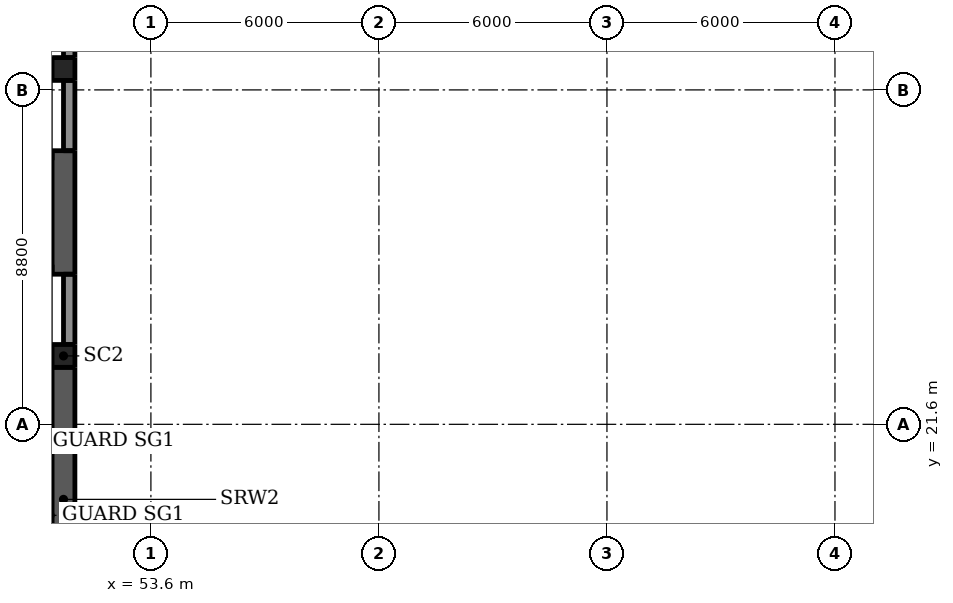
"""IFC4 building model, lengths in metres.
Left out: names, types, materials, properties, quantities, classifications, styles, units other than length and angle.
Written with IfcOpenShell. Run it as: python <this file> out.ifc"""

import sys

from ifc_helpers import new_model, si_unit, direction, frame, frame_2d, origin, origin_2d, place, context, subcontext, project, spatial, rectangle, extrude, element, fill, save


model = new_model("IFC4")
c1 = context("Model", 3, precision=1e-05, world=origin(), true_north=direction((0.0, 1.0)))
c2 = subcontext(c1, "Body", "Model", "MODEL_VIEW")
j1 = project(units=[si_unit("LENGTHUNIT", "METRE"), si_unit("PLANEANGLEUNIT", "RADIAN")], contexts=[c1])
p1 = place(None, origin())
s1 = spatial("IfcSite", under=j1, at=p1, CompositionType="ELEMENT")
p2 = place(p1, origin())
s2 = spatial("IfcBuilding", under=s1, at=p2, CompositionType="ELEMENT")
p3 = place(p2, frame((0.0, 0.0, 10.0)))
s3 = spatial("IfcBuildingStorey", under=s2, at=p3, CompositionType="ELEMENT", Elevation=10.0)
for number, where, z_axis, x_axis in (
    (1, (59.6, 20.6, 0.0), (0.0, 0.0, 1.0), (1.0, 0.0, 0.0)),
    (2, (65.6, 20.6, 0.0), (0.0, 0.0, 1.0), (1.0, 0.0, 0.0)),
    (3, (71.6, 20.6, 0.0), (0.0, 0.0, 1.0), (1.0, 0.0, 0.0)),
    (4, (52.6, 30.4, 0.0), (0.0, 0.0, 1.0), (1.0, 0.0, 0.0)),
):
    element("IfcColumn", number, at=place(p3, frame(where, z_axis=z_axis, x_axis=x_axis)), inside=s3, PredefinedType="COLUMN", context=c2, shape_type="SweptSolid", body=[
        extrude(rectangle(XDim=1.2, YDim=1.2, at=origin_2d()), origin(), (0.0, 0.0, 1.0), 4.2),
    ])
p4 = place(p3, frame((55.2, 23.2, 0.0), z_axis=(0.0, 0.0, 1.0), x_axis=(1.0, 0.0, 0.0)))
e5 = element("IfcColumn", 5, at=p4, inside=s3, PredefinedType="COLUMN", context=c2, shape_type="SweptSolid", body=[
    extrude(rectangle(XDim=3.2, YDim=3.2, at=origin_2d()), origin(), (0.0, 0.0, 1.0), 4.2),
])
for number, where, z_axis, x_axis in (
    (6, (51.3, 23.4, -0.3), (0.0, 0.0, 1.0), (1.0, 0.0, 0.0)),
    (7, (51.3, 30.95, -0.3), (0.0, 0.0, 1.0), (1.0, 0.0, 0.0)),
):
    element("IfcColumn", number, at=place(p3, frame(where, z_axis=z_axis, x_axis=x_axis)), inside=s3, PredefinedType="COLUMN", context=c2, shape_type="SweptSolid", body=[
        extrude(rectangle(XDim=0.6, YDim=0.6, at=origin_2d()), origin(), (0.0, 0.0, 1.0), 4.5),
    ])
p5 = place(p3, frame((51.3, 16.15, -0.3), z_axis=(0.0, 0.0, 1.0), x_axis=(0.0, 1.0, 0.0)))
e8 = element("IfcWall", 8, at=p5, inside=s3, PredefinedType="SHEAR", context=c2, shape_type="SweptSolid", body=[
    extrude(rectangle(XDim=6.95, YDim=0.6, at=frame_2d((3.475, 0.0))), origin(), (0.0, 0.0, 1.0), 4.5),
])
p6 = place(p3, frame((51.3, 25.55, -0.3), z_axis=(0.0, 0.0, 1.0), x_axis=(0.0, 1.0, 0.0)))
e9 = element("IfcWall", 9, at=p6, inside=s3, PredefinedType="SHEAR", context=c2, shape_type="SweptSolid", body=[
    extrude(rectangle(XDim=3.25, YDim=0.6, at=frame_2d((1.625, 0.0))), origin(), (0.0, 0.0, 1.0), 4.5),
])
p7 = place(p3, frame((52.125, 20.0, 0.0), z_axis=(0.0, 0.0, 1.0), x_axis=(0.0, 1.0, 0.0)))
e10 = element("IfcWall", 10, at=p7, inside=s3, PredefinedType="SOLIDWALL", context=c2, shape_type="SweptSolid", body=[
    extrude(rectangle(XDim=9.8, YDim=0.25, at=frame_2d((4.9, 0.0))), origin(), (0.0, 0.0, 1.0), 4.2),
])
p8 = place(p3, frame((52.125, 31.0, 0.0), z_axis=(0.0, 0.0, 1.0), x_axis=(0.0, 1.0, 0.0)))
e11 = element("IfcWall", 11, at=p8, inside=s3, PredefinedType="SOLIDWALL", context=c2, shape_type="SweptSolid", body=[
    extrude(rectangle(XDim=4.8, YDim=0.25, at=frame_2d((2.4, 0.0))), origin(), (0.0, 0.0, 1.0), 4.2),
])
p9 = place(p3, frame((51.45, 31.25, 0.0), z_axis=(0.0, 0.0, 1.0), x_axis=(0.0, 1.0, 0.0)))
e12 = element("IfcWall", 12, at=p9, inside=s3, PredefinedType="SOLIDWALL", context=c2, shape_type="SweptSolid", body=[
    extrude(rectangle(XDim=6.95, YDim=0.3, at=frame_2d((3.475, 0.0))), origin(), (0.0, 0.0, 1.0), 3.3),
])
p10 = place(p3, frame((51.45, 23.7, 0.0), z_axis=(0.0, 0.0, 1.0), x_axis=(0.0, 1.0, 0.0)))
e13 = element("IfcWall", 13, at=p10, inside=s3, PredefinedType="SOLIDWALL", context=c2, shape_type="SweptSolid", body=[
    extrude(rectangle(XDim=1.85, YDim=0.3, at=frame_2d((0.925, 0.0))), origin(), (0.0, 0.0, 1.0), 3.3),
])
p11 = place(p3, frame((51.45, 28.8, 0.0), z_axis=(0.0, 0.0, 1.0), x_axis=(0.0, 1.0, 0.0)))
e14 = element("IfcWall", 14, at=p11, inside=s3, PredefinedType="SOLIDWALL", context=c2, shape_type="SweptSolid", body=[
    extrude(rectangle(XDim=1.85, YDim=0.3, at=frame_2d((0.925, 0.0))), origin(), (0.0, 0.0, 1.0), 3.3),
])
p12 = place(p3, frame((53.2, 30.4, 0.0), z_axis=(0.0, 0.0, 1.0), x_axis=(1.0, 0.0, 0.0)))
e15 = element("IfcWall", 15, at=p12, inside=s3, PredefinedType="PARTITIONING", context=c2, shape_type="SweptSolid", body=[
    extrude(rectangle(XDim=6.28, YDim=0.15, at=frame_2d((3.14, 0.0))), origin(), (0.0, 0.0, 1.0), 3.797),
])
p13 = place(p3, frame((59.495, 30.4, 0.0), z_axis=(0.0, 0.0, 1.0), x_axis=(1.0, 0.0, 0.0)))
e16 = element("IfcWall", 16, at=p13, inside=s3, PredefinedType="PARTITIONING", context=c2, shape_type="SweptSolid", body=[
    extrude(rectangle(XDim=0.211, YDim=0.15, at=frame_2d((0.105, 0.0))), origin(), (0.0, 0.0, 1.0), 3.66),
])
p14 = place(p3, frame((59.705, 30.4, 0.0), z_axis=(0.0, 0.0, 1.0), x_axis=(1.0, 0.0, 0.0)))
e17 = element("IfcWall", 17, at=p14, inside=s3, PredefinedType="PARTITIONING", context=c2, shape_type="SweptSolid", body=[
    extrude(rectangle(XDim=5.789, YDim=0.15, at=frame_2d((2.895, 0.0))), origin(), (0.0, 0.0, 1.0), 4.2),
])
p15 = place(p3, frame((65.495, 30.4, 0.0), z_axis=(0.0, 0.0, 1.0), x_axis=(1.0, 0.0, 0.0)))
e18 = element("IfcWall", 18, at=p15, inside=s3, PredefinedType="PARTITIONING", context=c2, shape_type="SweptSolid", body=[
    extrude(rectangle(XDim=0.211, YDim=0.15, at=frame_2d((0.105, 0.0))), origin(), (0.0, 0.0, 1.0), 3.66),
])
p16 = place(p3, frame((65.705, 30.4, 0.0), z_axis=(0.0, 0.0, 1.0), x_axis=(1.0, 0.0, 0.0)))
e19 = element("IfcWall", 19, at=p16, inside=s3, PredefinedType="PARTITIONING", context=c2, shape_type="SweptSolid", body=[
    extrude(rectangle(XDim=5.789, YDim=0.15, at=frame_2d((2.895, 0.0))), origin(), (0.0, 0.0, 1.0), 4.2),
])
p17 = place(p16, frame((0.245, 0.0, 0.0)))
e20 = element("IfcOpeningElement", 20, at=p17, cuts=e19, PredefinedType="OPENING", context=c2, shape_type="SweptSolid", body=[
    extrude(rectangle(XDim=1.8, YDim=2.1, at=frame_2d((0.9, 1.05))), frame((0.0, 0.085, 0.0), z_axis=(0.0, -1.0, 0.0), x_axis=(1.0, 0.0, 0.0)), (0.0, 0.0, 1.0), 0.17),
])
p18 = place(p3, frame((71.495, 30.4, 0.0), z_axis=(0.0, 0.0, 1.0), x_axis=(1.0, 0.0, 0.0)))
e21 = element("IfcWall", 21, at=p18, inside=s3, PredefinedType="PARTITIONING", context=c2, shape_type="SweptSolid", body=[
    extrude(rectangle(XDim=0.211, YDim=0.15, at=frame_2d((0.105, 0.0))), origin(), (0.0, 0.0, 1.0), 3.66),
])
p19 = place(p3, frame((71.705, 30.4, 0.0), z_axis=(0.0, 0.0, 1.0), x_axis=(1.0, 0.0, 0.0)))
e22 = element("IfcWall", 22, at=p19, inside=s3, PredefinedType="PARTITIONING", context=c2, shape_type="SweptSolid", body=[
    extrude(rectangle(XDim=5.789, YDim=0.15, at=frame_2d((2.895, 0.0))), origin(), (0.0, 0.0, 1.0), 4.2),
])
p20 = place(p3, frame((59.6, 30.475, 0.0), z_axis=(0.0, 0.0, 1.0), x_axis=(0.0, 1.0, 0.0)))
e23 = element("IfcWall", 23, at=p20, inside=s3, PredefinedType="PARTITIONING", context=c2, shape_type="SweptSolid", body=[
    extrude(rectangle(XDim=5.82, YDim=0.15, at=frame_2d((2.91, 0.0))), origin(), (0.0, 0.0, 1.0), 3.66),
])
p21 = place(p3, frame((71.6, 21.2, 0.0), z_axis=(0.0, 0.0, 1.0), x_axis=(0.0, 1.0, 0.0)))
e24 = element("IfcWall", 24, at=p21, inside=s3, PredefinedType="PARTITIONING", context=c2, shape_type="SweptSolid", body=[
    extrude(rectangle(XDim=9.125, YDim=0.1, at=frame_2d((4.562, 0.0))), origin(), (0.0, 0.0, 1.0), 3.66),
])
p22 = place(p17, origin())
e25 = element("IfcDoor", 25, at=p22, inside=s3, OperationType="DOUBLE_DOOR_SINGLE_SWING", PredefinedType="DOOR", context=c2, shape_type="SweptSolid", body=[
    extrude(rectangle(XDim=1.8, YDim=2.1, at=frame_2d((0.9, 1.05))), frame((0.0, 0.025, 0.0), z_axis=(0.0, -1.0, 0.0), x_axis=(1.0, 0.0, 0.0)), (0.0, 0.0, 1.0), 0.05),
])
fill(e20, e25)
save(model, sys.argv[1])
